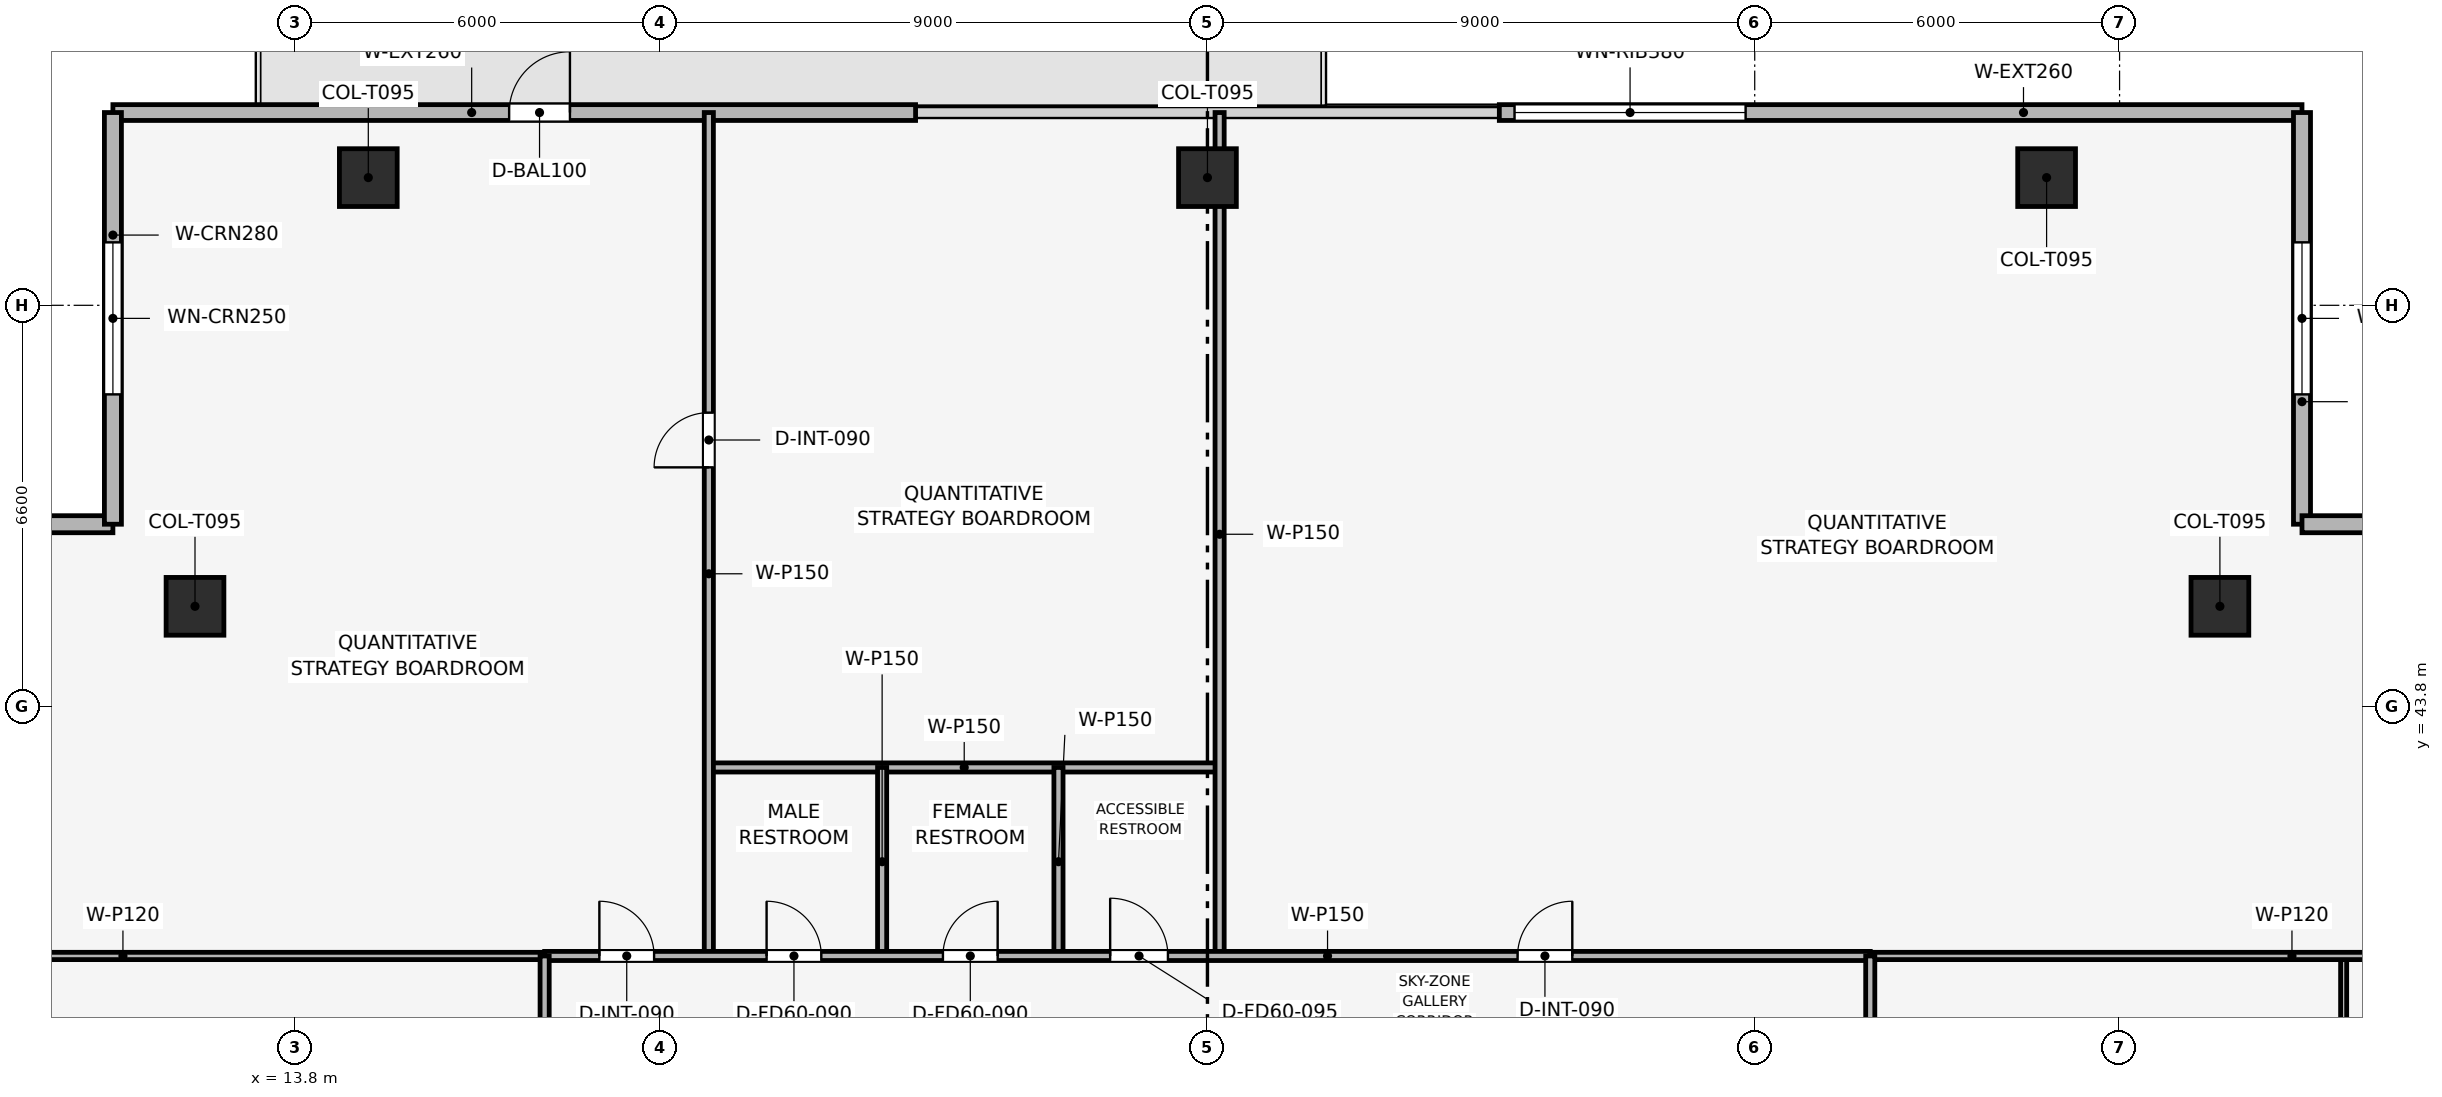
"""IFC4 building model, lengths in metres.
Left out: names, types, materials, properties, quantities, classifications, styles, units other than length and angle.
Written with IfcOpenShell. Run it as: python <this file> out.ifc"""

import sys

from ifc_helpers import new_model, si_unit, direction, frame, frame_2d, origin, origin_2d, place, context, subcontext, project, spatial, rectangle, extrude, element, fill, save


model = new_model("IFC4")
c1 = context("Model", 3, precision=1e-05, world=origin(), true_north=direction((0.0, 1.0)))
c2 = subcontext(c1, "Body", "Model", "MODEL_VIEW")
j1 = project(units=[si_unit("LENGTHUNIT", "METRE"), si_unit("PLANEANGLEUNIT", "RADIAN")], contexts=[c1])
p1 = place(None, origin())
s1 = spatial("IfcSite", under=j1, at=p1, CompositionType="ELEMENT")
p2 = place(p1, origin())
s2 = spatial("IfcBuilding", under=s1, at=p2, CompositionType="ELEMENT")
p3 = place(p2, frame((0.0, 0.0, 250.35)))
s3 = spatial("IfcBuildingStorey", under=s2, at=p3, CompositionType="ELEMENT", Elevation=250.35)
for number, where, z_axis, x_axis in (
    (1, (42.6, 52.5, 0.003), (0.0, 0.0, 1.0), (1.0, 0.0, 0.0)),
    (2, (28.8, 52.5, 0.003), (0.0, 0.0, 1.0), (1.0, 0.0, 0.0)),
    (3, (15.0, 52.5, 0.003), (0.0, 0.0, 1.0), (1.0, 0.0, 0.0)),
    (4, (45.45, 45.45, 0.003), (0.0, 0.0, 1.0), (1.0, 0.0, 0.0)),
    (5, (12.15, 45.45, 0.003), (0.0, 0.0, 1.0), (1.0, 0.0, 0.0)),
):
    element("IfcColumn", number, at=place(p3, frame(where, z_axis=z_axis, x_axis=x_axis)), inside=s3, PredefinedType="COLUMN", context=c2, shape_type="SweptSolid", body=[
        extrude(rectangle(XDim=0.95, YDim=0.95, at=origin_2d()), origin(), (0.0, 0.0, 1.0), 3.494),
    ])
p4 = place(p3, frame((10.8, 53.57, 0.0), z_axis=(0.0, 0.0, 1.0), x_axis=(1.0, 0.0, 0.0)))
e6 = element("IfcWall", 6, at=p4, inside=s3, PredefinedType="SOLIDWALL", context=c2, shape_type="SweptSolid", body=[
    extrude(rectangle(XDim=13.2, YDim=0.26, at=frame_2d((6.6, 0.0))), origin(), (0.0, 0.0, 1.0), 3.5),
])
p5 = place(p4, frame((6.516, 0.0, 0.0)))
e7 = element("IfcOpeningElement", 7, at=p5, cuts=e6, PredefinedType="OPENING", context=c2, shape_type="SweptSolid", body=[
    extrude(rectangle(XDim=1.0, YDim=2.2, at=frame_2d((0.5, 1.1))), frame((0.0, 0.14, 0.0), z_axis=(0.0, -1.0, 0.0), x_axis=(1.0, 0.0, 0.0)), (0.0, 0.0, 1.0), 0.28),
])
p6 = place(p3, frame((33.6, 53.57, 0.0), z_axis=(0.0, 0.0, 1.0), x_axis=(1.0, 0.0, 0.0)))
e8 = element("IfcWall", 8, at=p6, inside=s3, PredefinedType="SOLIDWALL", context=c2, shape_type="SweptSolid", body=[
    extrude(rectangle(XDim=13.2, YDim=0.26, at=frame_2d((6.6, 0.0))), origin(), (0.0, 0.0, 1.0), 3.5),
])
p7 = place(p6, frame((0.25, 0.0, 0.9)))
e9 = element("IfcOpeningElement", 9, at=p7, cuts=e8, PredefinedType="OPENING", context=c2, shape_type="SweptSolid", body=[
    extrude(rectangle(XDim=3.8, YDim=1.9, at=frame_2d((1.9, 0.95))), frame((0.0, 0.14, 0.0), z_axis=(0.0, -1.0, 0.0), x_axis=(1.0, 0.0, 0.0)), (0.0, 0.0, 1.0), 0.28),
])
p8 = place(p3, frame((4.03, 46.8, 0.0), z_axis=(0.0, 0.0, 1.0), x_axis=(1.0, 0.0, 0.0)))
e10 = element("IfcWall", 10, at=p8, inside=s3, PredefinedType="SOLIDWALL", context=c2, shape_type="SweptSolid", body=[
    extrude(rectangle(XDim=6.77, YDim=0.28, at=frame_2d((3.385, 0.0))), origin(), (0.0, 0.0, 1.0), 3.5),
])
p9 = place(p8, frame((2.135, 0.0, 0.9)))
e11 = element("IfcOpeningElement", 11, at=p9, cuts=e10, PredefinedType="OPENING", context=c2, shape_type="SweptSolid", body=[
    extrude(rectangle(XDim=2.5, YDim=1.9, at=frame_2d((1.25, 0.95))), frame((0.0, 0.15, 0.0), z_axis=(0.0, -1.0, 0.0), x_axis=(1.0, 0.0, 0.0)), (0.0, 0.0, 1.0), 0.3),
])
p10 = place(p3, frame((10.8, 46.8, 0.0), z_axis=(0.0, 0.0, 1.0), x_axis=(0.0, 1.0, 0.0)))
e12 = element("IfcWall", 12, at=p10, inside=s3, PredefinedType="SOLIDWALL", context=c2, shape_type="SweptSolid", body=[
    extrude(rectangle(XDim=6.77, YDim=0.28, at=frame_2d((3.385, 0.0))), origin(), (0.0, 0.0, 1.0), 3.5),
])
p11 = place(p10, frame((2.135, 0.0, 0.9)))
e13 = element("IfcOpeningElement", 13, at=p11, cuts=e12, PredefinedType="OPENING", context=c2, shape_type="SweptSolid", body=[
    extrude(rectangle(XDim=2.5, YDim=1.9, at=frame_2d((1.25, 0.95))), frame((0.0, 0.15, 0.0), z_axis=(0.0, -1.0, 0.0), x_axis=(1.0, 0.0, 0.0)), (0.0, 0.0, 1.0), 0.3),
])
p12 = place(p3, frame((46.8, 53.57, 0.0), z_axis=(0.0, 0.0, 1.0), x_axis=(0.0, -1.0, 0.0)))
e14 = element("IfcWall", 14, at=p12, inside=s3, PredefinedType="SOLIDWALL", context=c2, shape_type="SweptSolid", body=[
    extrude(rectangle(XDim=6.77, YDim=0.28, at=frame_2d((3.385, 0.0))), origin(), (0.0, 0.0, 1.0), 3.5),
])
p13 = place(p12, frame((2.135, 0.0, 0.9)))
e15 = element("IfcOpeningElement", 15, at=p13, cuts=e14, PredefinedType="OPENING", context=c2, shape_type="SweptSolid", body=[
    extrude(rectangle(XDim=2.5, YDim=1.9, at=frame_2d((1.25, 0.95))), frame((0.0, 0.15, 0.0), z_axis=(0.0, -1.0, 0.0), x_axis=(1.0, 0.0, 0.0)), (0.0, 0.0, 1.0), 0.3),
])
p14 = place(p3, frame((46.8, 46.8, 0.0), z_axis=(0.0, 0.0, 1.0), x_axis=(1.0, 0.0, 0.0)))
e16 = element("IfcWall", 16, at=p14, inside=s3, PredefinedType="SOLIDWALL", context=c2, shape_type="SweptSolid", body=[
    extrude(rectangle(XDim=6.77, YDim=0.28, at=frame_2d((3.385, 0.0))), origin(), (0.0, 0.0, 1.0), 3.5),
])
p15 = place(p14, frame((2.135, 0.0, 0.9)))
e17 = element("IfcOpeningElement", 17, at=p15, cuts=e16, PredefinedType="OPENING", context=c2, shape_type="SweptSolid", body=[
    extrude(rectangle(XDim=2.5, YDim=1.9, at=frame_2d((1.25, 0.95))), frame((0.0, 0.15, 0.0), z_axis=(0.0, -1.0, 0.0), x_axis=(1.0, 0.0, 0.0)), (0.0, 0.0, 1.0), 0.3),
])
p16 = place(p3, frame((20.6, 42.8, 0.0), z_axis=(0.0, 0.0, 1.0), x_axis=(1.0, 0.0, 0.0)))
e18 = element("IfcWall", 18, at=p16, inside=s3, PredefinedType="PARTITIONING", context=c2, shape_type="SweptSolid", body=[
    extrude(rectangle(XDim=8.4, YDim=0.15, at=frame_2d((4.2, 0.0))), origin(), (0.0, 0.0, 1.0), 3.085),
])
p17 = place(p3, frame((20.6, 39.7, 0.0), z_axis=(0.0, 0.0, 1.0), x_axis=(0.0, 1.0, 0.0)))
e19 = element("IfcWall", 19, at=p17, inside=s3, PredefinedType="PARTITIONING", context=c2, shape_type="SweptSolid", body=[
    extrude(rectangle(XDim=13.87, YDim=0.15, at=frame_2d((6.935, 0.0))), origin(), (0.0, 0.0, 1.0), 3.085),
])
p18 = place(p17, frame((8.035, 0.0, 0.0)))
e20 = element("IfcOpeningElement", 20, at=p18, cuts=e19, PredefinedType="OPENING", context=c2, shape_type="SweptSolid", body=[
    extrude(rectangle(XDim=0.9, YDim=2.1, at=frame_2d((0.45, 1.05))), frame((0.0, 0.085, 0.0), z_axis=(0.0, -1.0, 0.0), x_axis=(1.0, 0.0, 0.0)), (0.0, 0.0, 1.0), 0.17),
])
p19 = place(p3, frame((29.0, 39.7, 0.0), z_axis=(0.0, 0.0, 1.0), x_axis=(0.0, 1.0, 0.0)))
e21 = element("IfcWall", 21, at=p19, inside=s3, PredefinedType="PARTITIONING", context=c2, shape_type="SweptSolid", body=[
    extrude(rectangle(XDim=13.87, YDim=0.15, at=frame_2d((6.935, 0.0))), origin(), (0.0, 0.0, 1.0), 2.985),
])
for number, where, z_axis, x_axis in (
    (22, (23.45, 39.7, 0.0), (0.0, 0.0, 1.0), (0.0, 1.0, 0.0)),
    (23, (26.35, 39.7, 0.0), (0.0, 0.0, 1.0), (0.0, 1.0, 0.0)),
):
    element("IfcWall", number, at=place(p3, frame(where, z_axis=z_axis, x_axis=x_axis)), inside=s3, PredefinedType="PARTITIONING", context=c2, shape_type="SweptSolid", body=[
        extrude(rectangle(XDim=3.1, YDim=0.15, at=frame_2d((1.55, 0.0))), origin(), (0.0, 0.0, 1.0), 3.5),
    ])
p20 = place(p3, frame((47.485, 31.282, 0.0), z_axis=(0.0, 0.0, 1.0), x_axis=(0.0, 1.0, 0.0)))
e24 = element("IfcWall", 24, at=p20, inside=s3, PredefinedType="MOVABLE", context=c2, shape_type="SweptSolid", body=[
    extrude(rectangle(XDim=8.418, YDim=0.1, at=frame_2d((4.209, 0.0))), origin(), (0.0, 0.0, 1.0), 3.085),
])
p21 = place(p20, frame((4.056, 0.0, 0.0)))
e25 = element("IfcOpeningElement", 25, at=p21, cuts=e24, PredefinedType="OPENING", context=c2, shape_type="SweptSolid", body=[
    extrude(rectangle(XDim=0.9, YDim=2.1, at=frame_2d((0.45, 1.05))), frame((0.0, 0.06, 0.0), z_axis=(0.0, -1.0, 0.0), x_axis=(1.0, 0.0, 0.0)), (0.0, 0.0, 1.0), 0.12),
])
p22 = place(p3, frame((4.03, 39.7, 0.0), z_axis=(0.0, 0.0, 1.0), x_axis=(1.0, 0.0, 0.0)))
e26 = element("IfcWall", 26, at=p22, inside=s3, PredefinedType="PARTITIONING", context=c2, shape_type="SweptSolid", body=[
    extrude(rectangle(XDim=13.87, YDim=0.12, at=frame_2d((6.935, 0.0))), origin(), (0.0, 0.0, 1.0), 3.085),
])
p23 = place(p3, frame((39.7, 39.7, 0.0), z_axis=(0.0, 0.0, 1.0), x_axis=(1.0, 0.0, 0.0)))
e27 = element("IfcWall", 27, at=p23, inside=s3, PredefinedType="PARTITIONING", context=c2, shape_type="SweptSolid", body=[
    extrude(rectangle(XDim=13.87, YDim=0.12, at=frame_2d((6.935, 0.0))), origin(), (0.0, 0.0, 1.0), 3.085),
])
p24 = place(p3, frame((17.9, 39.7, 0.0), z_axis=(0.0, 0.0, 1.0), x_axis=(1.0, 0.0, 0.0)))
e28 = element("IfcWall", 28, at=p24, inside=s3, PredefinedType="PARTITIONING", context=c2, shape_type="SweptSolid", body=[
    extrude(rectangle(XDim=21.8, YDim=0.15, at=frame_2d((10.9, 0.0))), origin(), (0.0, 0.0, 1.0), 3.085),
])
p25 = place(p24, frame((0.9, 0.0, 0.0)))
e29 = element("IfcOpeningElement", 29, at=p25, cuts=e28, PredefinedType="OPENING", context=c2, shape_type="SweptSolid", body=[
    extrude(rectangle(XDim=0.9, YDim=2.1, at=frame_2d((0.45, 1.05))), frame((0.0, 0.085, 0.0), z_axis=(0.0, -1.0, 0.0), x_axis=(1.0, 0.0, 0.0)), (0.0, 0.0, 1.0), 0.17),
])
p26 = place(p24, frame((3.65, 0.0, 0.0)))
e30 = element("IfcOpeningElement", 30, at=p26, cuts=e28, PredefinedType="OPENING", context=c2, shape_type="SweptSolid", body=[
    extrude(rectangle(XDim=0.9, YDim=2.1, at=frame_2d((0.45, 1.05))), frame((0.0, 0.085, 0.0), z_axis=(0.0, -1.0, 0.0), x_axis=(1.0, 0.0, 0.0)), (0.0, 0.0, 1.0), 0.17),
])
p27 = place(p24, frame((6.55, 0.0, 0.0)))
e31 = element("IfcOpeningElement", 31, at=p27, cuts=e28, PredefinedType="OPENING", context=c2, shape_type="SweptSolid", body=[
    extrude(rectangle(XDim=0.9, YDim=2.1, at=frame_2d((0.45, 1.05))), frame((0.0, 0.085, 0.0), z_axis=(0.0, -1.0, 0.0), x_axis=(1.0, 0.0, 0.0)), (0.0, 0.0, 1.0), 0.17),
])
p28 = place(p24, frame((9.3, 0.0, 0.0)))
e32 = element("IfcOpeningElement", 32, at=p28, cuts=e28, PredefinedType="OPENING", context=c2, shape_type="SweptSolid", body=[
    extrude(rectangle(XDim=0.95, YDim=2.1, at=frame_2d((0.475, 1.05))), frame((0.0, 0.085, 0.0), z_axis=(0.0, -1.0, 0.0), x_axis=(1.0, 0.0, 0.0)), (0.0, 0.0, 1.0), 0.17),
])
p29 = place(p24, frame((16.0, 0.0, 0.0)))
e33 = element("IfcOpeningElement", 33, at=p29, cuts=e28, PredefinedType="OPENING", context=c2, shape_type="SweptSolid", body=[
    extrude(rectangle(XDim=0.9, YDim=2.1, at=frame_2d((0.45, 1.05))), frame((0.0, 0.085, 0.0), z_axis=(0.0, -1.0, 0.0), x_axis=(1.0, 0.0, 0.0)), (0.0, 0.0, 1.0), 0.17),
])
p30 = place(p3, frame((17.9, 10.8, 0.0), z_axis=(0.0, 0.0, 1.0), x_axis=(0.0, 1.0, 0.0)))
e34 = element("IfcWall", 34, at=p30, inside=s3, PredefinedType="PARTITIONING", context=c2, shape_type="SweptSolid", body=[
    extrude(rectangle(XDim=28.9, YDim=0.15, at=frame_2d((14.45, 0.0))), origin(), (0.0, 0.0, 1.0), 3.085),
])
p31 = place(p30, frame((14.0, 0.0, 0.0)))
e35 = element("IfcOpeningElement", 35, at=p31, cuts=e34, PredefinedType="OPENING", context=c2, shape_type="SweptSolid", body=[
    extrude(rectangle(XDim=0.9, YDim=2.1, at=frame_2d((0.45, 1.05))), frame((0.0, 0.085, 0.0), z_axis=(0.0, -1.0, 0.0), x_axis=(1.0, 0.0, 0.0)), (0.0, 0.0, 1.0), 0.17),
])
p32 = place(p3, frame((39.7, 24.4, 0.0), z_axis=(0.0, 0.0, 1.0), x_axis=(0.0, 1.0, 0.0)))
e36 = element("IfcWall", 36, at=p32, inside=s3, PredefinedType="PARTITIONING", context=c2, shape_type="SweptSolid", body=[
    extrude(rectangle(XDim=15.3, YDim=0.15, at=frame_2d((7.65, 0.0))), origin(), (0.0, 0.0, 1.0), 3.085),
])
p33 = place(p32, frame((0.7, 0.0, 0.0)))
e37 = element("IfcOpeningElement", 37, at=p33, cuts=e36, PredefinedType="OPENING", context=c2, shape_type="SweptSolid", body=[
    extrude(rectangle(XDim=0.9, YDim=2.1, at=frame_2d((0.45, 1.05))), frame((0.0, 0.085, 0.0), z_axis=(0.0, -1.0, 0.0), x_axis=(1.0, 0.0, 0.0)), (0.0, 0.0, 1.0), 0.17),
])
p34 = place(p32, frame((4.141, 0.0, 0.0)))
e38 = element("IfcOpeningElement", 38, at=p34, cuts=e36, PredefinedType="OPENING", context=c2, shape_type="SweptSolid", body=[
    extrude(rectangle(XDim=0.9, YDim=2.1, at=frame_2d((0.45, 1.05))), frame((0.0, 0.085, 0.0), z_axis=(0.0, -1.0, 0.0), x_axis=(1.0, 0.0, 0.0)), (0.0, 0.0, 1.0), 0.17),
])
p35 = place(p32, frame((10.641, 0.0, 0.0)))
e39 = element("IfcOpeningElement", 39, at=p35, cuts=e36, PredefinedType="OPENING", context=c2, shape_type="SweptSolid", body=[
    extrude(rectangle(XDim=0.9, YDim=2.1, at=frame_2d((0.45, 1.05))), frame((0.0, 0.085, 0.0), z_axis=(0.0, -1.0, 0.0), x_axis=(1.0, 0.0, 0.0)), (0.0, 0.0, 1.0), 0.17),
])
p36 = place(p5, origin())
e40 = element("IfcDoor", 40, at=p36, inside=s3, OperationType="SINGLE_SWING_RIGHT", PredefinedType="DOOR", context=c2, shape_type="SweptSolid", body=[
    extrude(rectangle(XDim=1.0, YDim=2.2, at=frame_2d((0.5, 1.1))), frame((0.0, 0.025, 0.0), z_axis=(0.0, -1.0, 0.0), x_axis=(1.0, 0.0, 0.0)), (0.0, 0.0, 1.0), 0.05),
])
fill(e7, e40)
p37 = place(p7, origin())
e41 = element("IfcWindow", 41, at=p37, inside=s3, PartitioningType="SINGLE_PANEL", PredefinedType="WINDOW", context=c2, shape_type="SweptSolid", body=[
    extrude(rectangle(XDim=3.8, YDim=1.9, at=frame_2d((1.9, 0.95))), frame((0.0, 0.03, 0.0), z_axis=(0.0, -1.0, 0.0), x_axis=(1.0, 0.0, 0.0)), (0.0, 0.0, 1.0), 0.06),
])
fill(e9, e41)
p38 = place(p11, origin())
e42 = element("IfcWindow", 42, at=p38, inside=s3, PartitioningType="SINGLE_PANEL", PredefinedType="WINDOW", context=c2, shape_type="SweptSolid", body=[
    extrude(rectangle(XDim=2.5, YDim=1.9, at=frame_2d((1.25, 0.95))), frame((0.0, 0.03, 0.0), z_axis=(0.0, -1.0, 0.0), x_axis=(1.0, 0.0, 0.0)), (0.0, 0.0, 1.0), 0.06),
])
fill(e13, e42)
p39 = place(p13, origin())
e43 = element("IfcWindow", 43, at=p39, inside=s3, PartitioningType="SINGLE_PANEL", PredefinedType="WINDOW", context=c2, shape_type="SweptSolid", body=[
    extrude(rectangle(XDim=2.5, YDim=1.9, at=frame_2d((1.25, 0.95))), frame((0.0, 0.03, 0.0), z_axis=(0.0, -1.0, 0.0), x_axis=(1.0, 0.0, 0.0)), (0.0, 0.0, 1.0), 0.06),
])
fill(e15, e43)
p40 = place(p18, origin())
e44 = element("IfcDoor", 44, at=p40, inside=s3, OperationType="SINGLE_SWING_LEFT", PredefinedType="DOOR", context=c2, shape_type="SweptSolid", body=[
    extrude(rectangle(XDim=0.9, YDim=2.1, at=frame_2d((0.45, 1.05))), frame((0.0, 0.025, 0.0), z_axis=(0.0, -1.0, 0.0), x_axis=(1.0, 0.0, 0.0)), (0.0, 0.0, 1.0), 0.05),
])
fill(e20, e44)
p41 = place(p25, origin())
e45 = element("IfcDoor", 45, at=p41, inside=s3, OperationType="SINGLE_SWING_LEFT", PredefinedType="DOOR", context=c2, shape_type="SweptSolid", body=[
    extrude(rectangle(XDim=0.9, YDim=2.1, at=frame_2d((0.45, 1.05))), frame((0.0, 0.025, 0.0), z_axis=(0.0, -1.0, 0.0), x_axis=(1.0, 0.0, 0.0)), (0.0, 0.0, 1.0), 0.05),
])
fill(e29, e45)
p42 = place(p26, origin())
e46 = element("IfcDoor", 46, at=p42, inside=s3, OperationType="SINGLE_SWING_LEFT", PredefinedType="DOOR", context=c2, shape_type="SweptSolid", body=[
    extrude(rectangle(XDim=0.9, YDim=2.1, at=frame_2d((0.45, 1.05))), frame((0.0, 0.025, 0.0), z_axis=(0.0, -1.0, 0.0), x_axis=(1.0, 0.0, 0.0)), (0.0, 0.0, 1.0), 0.05),
])
fill(e30, e46)
p43 = place(p27, origin())
e47 = element("IfcDoor", 47, at=p43, inside=s3, OperationType="SINGLE_SWING_RIGHT", PredefinedType="DOOR", context=c2, shape_type="SweptSolid", body=[
    extrude(rectangle(XDim=0.9, YDim=2.1, at=frame_2d((0.45, 1.05))), frame((0.0, 0.025, 0.0), z_axis=(0.0, -1.0, 0.0), x_axis=(1.0, 0.0, 0.0)), (0.0, 0.0, 1.0), 0.05),
])
fill(e31, e47)
p44 = place(p28, origin())
e48 = element("IfcDoor", 48, at=p44, inside=s3, OperationType="SINGLE_SWING_LEFT", PredefinedType="DOOR", context=c2, shape_type="SweptSolid", body=[
    extrude(rectangle(XDim=0.95, YDim=2.1, at=frame_2d((0.475, 1.05))), frame((0.0, 0.025, 0.0), z_axis=(0.0, -1.0, 0.0), x_axis=(1.0, 0.0, 0.0)), (0.0, 0.0, 1.0), 0.05),
])
fill(e32, e48)
p45 = place(p29, origin())
e49 = element("IfcDoor", 49, at=p45, inside=s3, OperationType="SINGLE_SWING_RIGHT", PredefinedType="DOOR", context=c2, shape_type="SweptSolid", body=[
    extrude(rectangle(XDim=0.9, YDim=2.1, at=frame_2d((0.45, 1.05))), frame((0.0, 0.025, 0.0), z_axis=(0.0, -1.0, 0.0), x_axis=(1.0, 0.0, 0.0)), (0.0, 0.0, 1.0), 0.05),
])
fill(e33, e49)
save(model, sys.argv[1])
